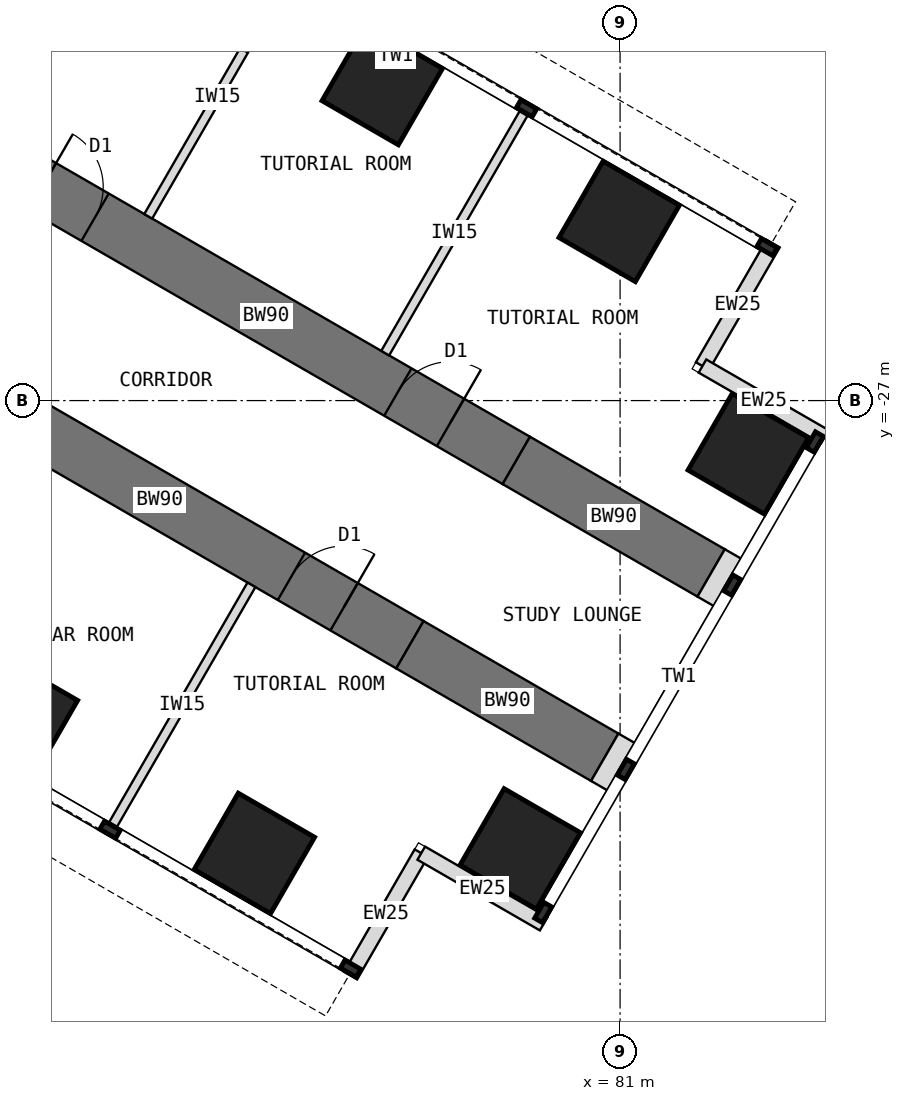
"""IFC4 building model, lengths in metres.
Left out: names, types, materials, properties, quantities, classifications, styles, units other than length and angle.
Written with IfcOpenShell. Run it as: python <this file> out.ifc"""

import sys

from ifc_helpers import new_model, si_unit, direction, frame, frame_2d, origin, origin_2d, place, context, subcontext, project, spatial, rectangle, extrude, element, fill, save


model = new_model("IFC4")
c1 = context("Model", 3, precision=1e-05, world=origin(), true_north=direction((0.0, 1.0)))
c2 = subcontext(c1, "Body", "Model", "MODEL_VIEW")
j1 = project(units=[si_unit("LENGTHUNIT", "METRE"), si_unit("PLANEANGLEUNIT", "RADIAN")], contexts=[c1])
p1 = place(None, origin())
s1 = spatial("IfcSite", under=j1, at=p1, CompositionType="ELEMENT")
p2 = place(p1, origin())
s2 = spatial("IfcBuilding", under=s1, at=p2, CompositionType="ELEMENT")
p3 = place(p2, frame((0.0, 0.0, 64.5)))
s3 = spatial("IfcBuildingStorey", under=s2, at=p3, CompositionType="ELEMENT", Elevation=64.5)
p4 = place(p3, frame((71.066, -23.234, 0.0), z_axis=(0.0, 0.0, 1.0), x_axis=(0.86602681393, -0.499997557548, 0.0)))
e1 = element("IfcWall", 1, at=p4, inside=s3, PredefinedType="SHEAR", context=c2, shape_type="SweptSolid", body=[
    extrude(rectangle(XDim=9.5, YDim=0.9, at=frame_2d((4.75, 0.0))), origin(), (0.0, 0.0, 1.0), 4.0),
])
p5 = place(p4, frame((0.5, 0.0, 0.0)))
e2 = element("IfcOpeningElement", 2, at=p5, cuts=e1, PredefinedType="OPENING", context=c2, shape_type="SweptSolid", body=[
    extrude(rectangle(XDim=1.0, YDim=2.1, at=frame_2d((0.5, 1.05))), frame((0.0, 0.46, 0.0), z_axis=(0.0, -1.0, 0.0), x_axis=(1.0, 0.0, 0.0)), (0.0, 0.0, 1.0), 0.92),
])
p6 = place(p4, frame((7.25, 0.0, 0.0)))
e3 = element("IfcOpeningElement", 3, at=p6, cuts=e1, PredefinedType="OPENING", context=c2, shape_type="SweptSolid", body=[
    extrude(rectangle(XDim=1.0, YDim=2.1, at=frame_2d((0.5, 1.05))), frame((0.0, 0.46, 0.0), z_axis=(0.0, -1.0, 0.0), x_axis=(1.0, 0.0, 0.0)), (0.0, 0.0, 1.0), 0.92),
])
p7 = place(p3, frame((79.294, -27.984, 0.0), z_axis=(0.0, 0.0, 1.0), x_axis=(0.866000971088, -0.500042316284, 0.0)))
e4 = element("IfcWall", 4, at=p7, inside=s3, PredefinedType="SHEAR", context=c2, shape_type="SweptSolid", body=[
    extrude(rectangle(XDim=3.7, YDim=0.9, at=frame_2d((1.85, 0.0))), origin(), (0.0, 0.0, 1.0), 4.0),
])
p8 = place(p3, frame((69.316, -26.266, 0.0), z_axis=(0.0, 0.0, 1.0), x_axis=(0.86602681393, -0.499997557548, 0.0)))
e5 = element("IfcWall", 5, at=p8, inside=s3, PredefinedType="SHEAR", context=c2, shape_type="SweptSolid", body=[
    extrude(rectangle(XDim=9.5, YDim=0.9, at=frame_2d((4.75, 0.0))), origin(), (0.0, 0.0, 1.0), 4.0),
])
p9 = place(p8, frame((0.5, 0.0, 0.0)))
e6 = element("IfcOpeningElement", 6, at=p9, cuts=e5, PredefinedType="OPENING", context=c2, shape_type="SweptSolid", body=[
    extrude(rectangle(XDim=1.0, YDim=2.1, at=frame_2d((0.5, 1.05))), frame((0.0, 0.46, 0.0), z_axis=(0.0, -1.0, 0.0), x_axis=(1.0, 0.0, 0.0)), (0.0, 0.0, 1.0), 0.92),
])
p10 = place(p8, frame((7.25, 0.0, 0.0)))
e7 = element("IfcOpeningElement", 7, at=p10, cuts=e5, PredefinedType="OPENING", context=c2, shape_type="SweptSolid", body=[
    extrude(rectangle(XDim=1.0, YDim=2.1, at=frame_2d((0.5, 1.05))), frame((0.0, 0.46, 0.0), z_axis=(0.0, -1.0, 0.0), x_axis=(1.0, 0.0, 0.0)), (0.0, 0.0, 1.0), 0.92),
])
p11 = place(p3, frame((77.544, -31.016, 0.0), z_axis=(0.0, 0.0, 1.0), x_axis=(0.866029545028, -0.499992827086, 0.0)))
e8 = element("IfcWall", 8, at=p11, inside=s3, PredefinedType="SHEAR", context=c2, shape_type="SweptSolid", body=[
    extrude(rectangle(XDim=3.7, YDim=0.9, at=frame_2d((1.85, 0.0))), origin(), (0.0, 0.0, 1.0), 4.0),
])
for number, where, z_axis, x_axis in (
    (9, (77.088, -21.804, 0.0), (0.0, 0.0, 1.0), (0.5, 0.866, 0.0)),
    (10, (71.088, -32.196, 0.0), (0.0, 0.0, 1.0), (0.5, 0.866, 0.0)),
    (11, (80.986, -24.054, 0.0), (0.0, 0.0, 1.0), (0.5, 0.866, 0.0)),
    (12, (74.986, -34.446, 0.0), (0.0, 0.0, 1.0), (0.5, 0.866, 0.0)),
    (13, (83.108, -27.877, 0.0), (0.0, 0.0, 1.0), (0.5, 0.866, 0.0)),
    (14, (79.358, -34.373, 0.0), (0.0, 0.0, 1.0), (0.5, 0.866, 0.0)),
):
    element("IfcColumn", number, at=place(p3, frame(where, z_axis=z_axis, x_axis=x_axis)), inside=s3, PredefinedType="COLUMN", context=c2, shape_type="SweptSolid", body=[
        extrude(rectangle(XDim=1.45, YDim=1.45, at=origin_2d()), origin(), (0.0, 0.0, 1.0), 4.0),
    ])
for number, where, z_axis, x_axis in (
    (15, (83.517, -24.419, 0.0), (0.0, 0.0, 1.0), (-0.5, -0.866, 0.0)),
    (16, (82.355, -26.432, 0.0), (0.0, 0.0, 1.0), (0.866, -0.5, 0.0)),
    (17, (76.567, -36.456, 0.0), (0.0, 0.0, 1.0), (0.5, 0.866, 0.0)),
    (18, (77.73, -34.443, 0.0), (0.0, 0.0, 1.0), (0.866, -0.5, 0.0)),
):
    element("IfcWall", number, at=place(p3, frame(where, z_axis=z_axis, x_axis=x_axis)), inside=s3, PredefinedType="STANDARD", context=c2, shape_type="SweptSolid", body=[
        extrude(rectangle(XDim=2.325, YDim=0.25, at=frame_2d((1.163, 0.0))), origin(), (0.0, 0.0, 1.0), 3.8),
    ])
for number, where, z_axis, x_axis in (
    (19, (82.498, -29.834, 0.0), (0.0, 0.0, 1.0), (0.866, -0.5, 0.0)),
    (20, (80.748, -32.865, 0.0), (0.0, 0.0, 1.0), (0.866, -0.5, 0.0)),
):
    element("IfcWall", number, at=place(p3, frame(where, z_axis=z_axis, x_axis=x_axis)), inside=s3, PredefinedType="PARTITIONING", context=c2, shape_type="SweptSolid", body=[
        extrude(rectangle(XDim=0.31, YDim=0.9, at=frame_2d((0.155, 0.0))), origin(), (0.0, 0.0, 1.0), 3.8),
    ])
p12 = place(p3, frame((73.24, -23.97, 0.0), z_axis=(0.0, 0.0, 1.0), x_axis=(0.499982560684, 0.866035472144, 0.0)))
e21 = element("IfcWall", 21, at=p12, inside=s3, PredefinedType="PARTITIONING", context=c2, shape_type="SweptSolid", body=[
    extrude(rectangle(XDim=4.55, YDim=0.15, at=frame_2d((2.275, 0.0))), origin(), (0.0, 0.0, 1.0), 3.8),
])
p13 = place(p12, frame((3.15, 0.0, 0.0)))
e22 = element("IfcOpeningElement", 22, at=p13, cuts=e21, PredefinedType="OPENING", context=c2, shape_type="SweptSolid", body=[
    extrude(rectangle(XDim=1.0, YDim=2.1, at=frame_2d((0.5, 1.05))), frame((0.0, 0.085, 0.0), z_axis=(0.0, -1.0, 0.0), x_axis=(1.0, 0.0, 0.0)), (0.0, 0.0, 1.0), 0.17),
])
for number, where, z_axis, x_axis in (
    (23, (77.137, -26.22, 0.0), (0.0, 0.0, 1.0), (0.5, 0.866, 0.0)),
    (24, (74.937, -30.03, 0.0), (0.0, 0.0, 1.0), (-0.5, -0.866, 0.0)),
):
    element("IfcWall", number, at=place(p3, frame(where, z_axis=z_axis, x_axis=x_axis)), inside=s3, PredefinedType="PARTITIONING", context=c2, shape_type="SweptSolid", body=[
        extrude(rectangle(XDim=4.55, YDim=0.15, at=frame_2d((2.275, 0.0))), origin(), (0.0, 0.0, 1.0), 3.8),
    ])
p14 = place(p5, origin())
e25 = element("IfcDoor", 25, at=p14, inside=s3, OperationType="SINGLE_SWING_LEFT", PredefinedType="DOOR", context=c2, shape_type="SweptSolid", body=[
    extrude(rectangle(XDim=0.92, YDim=2.06, at=frame_2d((0.5, 1.03))), frame((0.0, 0.025, 0.0), z_axis=(0.0, -1.0, 0.0), x_axis=(1.0, 0.0, 0.0)), (0.0, 0.0, 1.0), 0.05),
    extrude(rectangle(XDim=0.04, YDim=2.1, at=frame_2d((0.02, 1.05))), frame((0.0, 0.45, 0.0), z_axis=(0.0, -1.0, 0.0), x_axis=(1.0, 0.0, 0.0)), (0.0, 0.0, 1.0), 0.899),
    extrude(rectangle(XDim=0.04, YDim=2.1, at=frame_2d((0.98, 1.05))), frame((0.0, 0.45, 0.0), z_axis=(0.0, -1.0, 0.0), x_axis=(1.0, 0.0, 0.0)), (0.0, 0.0, 1.0), 0.899),
    extrude(rectangle(XDim=0.92, YDim=0.04, at=frame_2d((0.5, 2.08))), frame((0.0, 0.45, 0.0), z_axis=(0.0, -1.0, 0.0), x_axis=(1.0, 0.0, 0.0)), (0.0, 0.0, 1.0), 0.899),
])
fill(e2, e25)
p15 = place(p6, origin())
e26 = element("IfcDoor", 26, at=p15, inside=s3, OperationType="SINGLE_SWING_RIGHT", PredefinedType="DOOR", context=c2, shape_type="SweptSolid", body=[
    extrude(rectangle(XDim=0.92, YDim=2.06, at=frame_2d((0.5, 1.03))), frame((0.0, 0.025, 0.0), z_axis=(0.0, -1.0, 0.0), x_axis=(1.0, 0.0, 0.0)), (0.0, 0.0, 1.0), 0.05),
    extrude(rectangle(XDim=0.04, YDim=2.1, at=frame_2d((0.02, 1.05))), frame((0.0, 0.45, 0.0), z_axis=(0.0, -1.0, 0.0), x_axis=(1.0, 0.0, 0.0)), (0.0, 0.0, 1.0), 0.899),
    extrude(rectangle(XDim=0.04, YDim=2.1, at=frame_2d((0.98, 1.05))), frame((0.0, 0.45, 0.0), z_axis=(0.0, -1.0, 0.0), x_axis=(1.0, 0.0, 0.0)), (0.0, 0.0, 1.0), 0.899),
    extrude(rectangle(XDim=0.92, YDim=0.04, at=frame_2d((0.5, 2.08))), frame((0.0, 0.45, 0.0), z_axis=(0.0, -1.0, 0.0), x_axis=(1.0, 0.0, 0.0)), (0.0, 0.0, 1.0), 0.899),
])
fill(e3, e26)
p16 = place(p10, origin())
e27 = element("IfcDoor", 27, at=p16, inside=s3, OperationType="SINGLE_SWING_RIGHT", PredefinedType="DOOR", context=c2, shape_type="SweptSolid", body=[
    extrude(rectangle(XDim=0.92, YDim=2.06, at=frame_2d((0.5, 1.03))), frame((0.0, 0.025, 0.0), z_axis=(0.0, -1.0, 0.0), x_axis=(1.0, 0.0, 0.0)), (0.0, 0.0, 1.0), 0.05),
    extrude(rectangle(XDim=0.04, YDim=2.1, at=frame_2d((0.02, 1.05))), frame((0.0, 0.45, 0.0), z_axis=(0.0, -1.0, 0.0), x_axis=(1.0, 0.0, 0.0)), (0.0, 0.0, 1.0), 0.899),
    extrude(rectangle(XDim=0.04, YDim=2.1, at=frame_2d((0.98, 1.05))), frame((0.0, 0.45, 0.0), z_axis=(0.0, -1.0, 0.0), x_axis=(1.0, 0.0, 0.0)), (0.0, 0.0, 1.0), 0.899),
    extrude(rectangle(XDim=0.92, YDim=0.04, at=frame_2d((0.5, 2.08))), frame((0.0, 0.45, 0.0), z_axis=(0.0, -1.0, 0.0), x_axis=(1.0, 0.0, 0.0)), (0.0, 0.0, 1.0), 0.899),
])
fill(e7, e27)
save(model, sys.argv[1])
